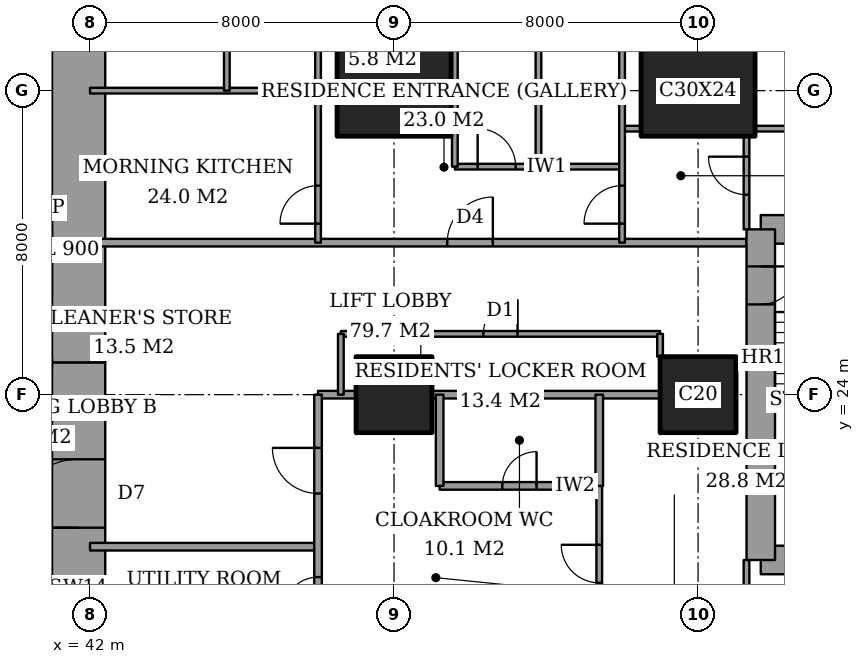
"""IFC4 building model, lengths in metres.
Left out: names, types, materials, properties, quantities, classifications, styles, units other than length and angle.
Written with IfcOpenShell. Run it as: python <this file> out.ifc"""

import sys

from ifc_helpers import new_model, si_unit, direction, frame, frame_2d, origin, origin_2d, place, context, subcontext, project, spatial, rectangle, extrude, element, fill, save


model = new_model("IFC4")
c1 = context("Model", 3, precision=1e-05, world=origin(), true_north=direction((0.0, 1.0)))
c2 = subcontext(c1, "Body", "Model", "MODEL_VIEW")
j1 = project(units=[si_unit("LENGTHUNIT", "METRE"), si_unit("PLANEANGLEUNIT", "RADIAN")], contexts=[c1])
p1 = place(None, origin())
s1 = spatial("IfcSite", under=j1, at=p1, CompositionType="ELEMENT")
p2 = place(p1, origin())
s2 = spatial("IfcBuilding", under=s1, at=p2, CompositionType="ELEMENT")
p3 = place(p2, frame((0.0, 0.0, 153.8)))
s3 = spatial("IfcBuildingStorey", under=s2, at=p3, CompositionType="ELEMENT", Elevation=153.8)
p4 = place(p3, frame((50.0, 24.0, 0.0), z_axis=(0.0, 0.0, 1.0), x_axis=(1.0, 0.0, 0.0)))
e1 = element("IfcColumn", 1, at=p4, inside=s3, PredefinedType="COLUMN", context=c2, shape_type="SweptSolid", body=[
    extrude(rectangle(XDim=2.0, YDim=2.0, at=origin_2d()), origin(), (0.0, 0.0, 1.0), 3.6),
])
p5 = place(p3, frame((50.0, 32.0, 0.0), z_axis=(0.0, 0.0, 1.0), x_axis=(1.0, 0.0, 0.0)))
e2 = element("IfcColumn", 2, at=p5, inside=s3, PredefinedType="COLUMN", context=c2, shape_type="SweptSolid", body=[
    extrude(rectangle(XDim=3.0, YDim=2.4, at=origin_2d()), origin(), (0.0, 0.0, 1.0), 3.6),
])
p6 = place(p3, frame((58.0, 24.0, 0.0), z_axis=(0.0, 0.0, 1.0), x_axis=(1.0, 0.0, 0.0)))
e3 = element("IfcColumn", 3, at=p6, inside=s3, PredefinedType="COLUMN", context=c2, shape_type="SweptSolid", body=[
    extrude(rectangle(XDim=2.0, YDim=2.0, at=origin_2d()), origin(), (0.0, 0.0, 1.0), 3.6),
])
p7 = place(p3, frame((58.0, 32.0, 0.0), z_axis=(0.0, 0.0, 1.0), x_axis=(1.0, 0.0, 0.0)))
e4 = element("IfcColumn", 4, at=p7, inside=s3, PredefinedType="COLUMN", context=c2, shape_type="SweptSolid", body=[
    extrude(rectangle(XDim=3.0, YDim=2.4, at=origin_2d()), origin(), (0.0, 0.0, 1.0), 3.6),
])
p8 = place(p3, frame((41.7, 13.0, 0.0), z_axis=(0.0, 0.0, 1.0), x_axis=(0.0, 1.0, 0.0)))
e5 = element("IfcWall", 5, at=p8, inside=s3, PredefinedType="SHEAR", context=c2, shape_type="SweptSolid", body=[
    extrude(rectangle(XDim=11.85, YDim=1.4, at=frame_2d((5.925, 0.0))), origin(), (0.0, 0.0, 1.0), 3.6),
])
p9 = place(p8, frame((7.5, 0.0, 0.0)))
e6 = element("IfcOpeningElement", 6, at=p9, cuts=e5, PredefinedType="OPENING", context=c2, shape_type="SweptSolid", body=[
    extrude(rectangle(XDim=1.8, YDim=2.4, at=frame_2d((0.9, 1.2))), frame((0.0, 0.71, 0.0), z_axis=(0.0, -1.0, 0.0), x_axis=(1.0, 0.0, 0.0)), (0.0, 0.0, 1.0), 1.42),
])
p10 = place(p3, frame((41.7, 24.85, 0.0), z_axis=(0.0, 0.0, 1.0), x_axis=(0.0, 1.0, 0.0)))
e7 = element("IfcWall", 7, at=p10, inside=s3, PredefinedType="SHEAR", context=c2, shape_type="SweptSolid", body=[
    extrude(rectangle(XDim=10.15, YDim=1.4, at=frame_2d((5.075, 0.0))), origin(), (0.0, 0.0, 1.0), 3.6),
])
for number, where, z_axis, x_axis in (
    (8, (59.65, 19.65, 0.0), (0.0, 0.0, 1.0), (1.0, 0.0, 0.0)),
    (9, (64.1, 28.35, 0.0), (0.0, 0.0, 1.0), (-1.0, 0.0, 0.0)),
):
    element("IfcWall", number, at=place(p3, frame(where, z_axis=z_axis, x_axis=x_axis)), inside=s3, PredefinedType="SHEAR", context=c2, shape_type="SweptSolid", body=[
        extrude(rectangle(XDim=4.45, YDim=0.75, at=frame_2d((2.225, 0.0))), origin(), (0.0, 0.0, 1.0), 3.6),
    ])
p11 = place(p3, frame((59.65, 28.35, 0.0), z_axis=(0.0, 0.0, 1.0), x_axis=(0.0, -1.0, 0.0)))
e10 = element("IfcWall", 10, at=p11, inside=s3, PredefinedType="SHEAR", context=c2, shape_type="SweptSolid", body=[
    extrude(rectangle(XDim=8.7, YDim=0.75, at=frame_2d((4.35, 0.0))), origin(), (0.0, 0.0, 1.0), 3.6),
])
p12 = place(p11, frame((0.975, 0.0, 0.0)))
e11 = element("IfcOpeningElement", 11, at=p12, cuts=e10, PredefinedType="OPENING", context=c2, shape_type="SweptSolid", body=[
    extrude(rectangle(XDim=1.0, YDim=2.1, at=frame_2d((0.5, 1.05))), frame((0.0, 0.385, 0.0), z_axis=(0.0, -1.0, 0.0), x_axis=(1.0, 0.0, 0.0)), (0.0, 0.0, 1.0), 0.77),
])
p13 = place(p3, frame((42.0, 20.0, 0.0), z_axis=(0.0, 0.0, 1.0), x_axis=(1.0, 0.0, 0.0)))
e12 = element("IfcWall", 12, at=p13, inside=s3, PredefinedType="PARTITIONING", context=c2, shape_type="SweptSolid", body=[
    extrude(rectangle(XDim=6.0, YDim=0.2, at=frame_2d((3.0, 0.0))), origin(), (0.0, 0.0, 1.0), 3.35),
])
p14 = place(p3, frame((51.2, 21.6, 0.0), z_axis=(0.0, 0.0, 1.0), x_axis=(1.0, 0.0, 0.0)))
e13 = element("IfcWall", 13, at=p14, inside=s3, PredefinedType="PARTITIONING", context=c2, shape_type="SweptSolid", body=[
    extrude(rectangle(XDim=4.2, YDim=0.2, at=frame_2d((2.1, 0.0))), origin(), (0.0, 0.0, 1.0), 3.35),
])
p15 = place(p14, frame((1.65, 0.0, 0.0)))
e14 = element("IfcOpeningElement", 14, at=p15, cuts=e13, PredefinedType="OPENING", context=c2, shape_type="SweptSolid", body=[
    extrude(rectangle(XDim=0.9, YDim=2.1, at=frame_2d((0.45, 1.05))), frame((0.0, 0.11, 0.0), z_axis=(0.0, -1.0, 0.0), x_axis=(1.0, 0.0, 0.0)), (0.0, 0.0, 1.0), 0.22),
])
p16 = place(p3, frame((48.0, 24.0, 0.0), z_axis=(0.0, 0.0, 1.0), x_axis=(1.0, 0.0, 0.0)))
e15 = element("IfcWall", 15, at=p16, inside=s3, PredefinedType="PARTITIONING", context=c2, shape_type="SweptSolid", body=[
    extrude(rectangle(XDim=1.0, YDim=0.2, at=frame_2d((0.5, 0.0))), origin(), (0.0, 0.0, 1.0), 3.35),
])
p17 = place(p3, frame((51.0, 24.0, 0.0), z_axis=(0.0, 0.0, 1.0), x_axis=(1.0, 0.0, 0.0)))
e16 = element("IfcWall", 16, at=p17, inside=s3, PredefinedType="PARTITIONING", context=c2, shape_type="SweptSolid", body=[
    extrude(rectangle(XDim=6.0, YDim=0.2, at=frame_2d((3.0, 0.0))), origin(), (0.0, 0.0, 1.0), 3.35),
])
p18 = place(p3, frame((48.6, 25.6, 0.0), z_axis=(0.0, 0.0, 1.0), x_axis=(1.0, 0.0, 0.0)))
e17 = element("IfcWall", 17, at=p18, inside=s3, PredefinedType="PARTITIONING", context=c2, shape_type="SweptSolid", body=[
    extrude(rectangle(XDim=8.4, YDim=0.15, at=frame_2d((4.2, 0.0))), origin(), (0.0, 0.0, 1.0), 3.35),
])
p19 = place(p18, frame((3.75, 0.0, 0.0)))
e18 = element("IfcOpeningElement", 18, at=p19, cuts=e17, PredefinedType="OPENING", context=c2, shape_type="SweptSolid", body=[
    extrude(rectangle(XDim=0.9, YDim=2.1, at=frame_2d((0.45, 1.05))), frame((0.0, 0.085, 0.0), z_axis=(0.0, -1.0, 0.0), x_axis=(1.0, 0.0, 0.0)), (0.0, 0.0, 1.0), 0.17),
])
p20 = place(p3, frame((42.0, 28.0, 0.0), z_axis=(0.0, 0.0, 1.0), x_axis=(1.0, 0.0, 0.0)))
e19 = element("IfcWall", 19, at=p20, inside=s3, PredefinedType="PARTITIONING", context=c2, shape_type="SweptSolid", body=[
    extrude(rectangle(XDim=17.275, YDim=0.2, at=frame_2d((8.637, 0.0))), origin(), (0.0, 0.0, 1.0), 3.35),
])
p21 = place(p20, frame((9.4, 0.0, 0.0)))
e20 = element("IfcOpeningElement", 20, at=p21, cuts=e19, PredefinedType="OPENING", context=c2, shape_type="SweptSolid", body=[
    extrude(rectangle(XDim=1.2, YDim=2.4, at=frame_2d((0.6, 1.2))), frame((0.0, 0.11, 0.0), z_axis=(0.0, -1.0, 0.0), x_axis=(1.0, 0.0, 0.0)), (0.0, 0.0, 1.0), 0.22),
])
p22 = place(p3, frame((51.6, 30.0, 0.0), z_axis=(0.0, 0.0, 1.0), x_axis=(1.0, 0.0, 0.0)))
e21 = element("IfcWall", 21, at=p22, inside=s3, PredefinedType="PARTITIONING", context=c2, shape_type="SweptSolid", body=[
    extrude(rectangle(XDim=4.4, YDim=0.15, at=frame_2d((2.2, 0.0))), origin(), (0.0, 0.0, 1.0), 3.35),
])
p23 = place(p22, frame((0.6, 0.0, 0.0)))
e22 = element("IfcOpeningElement", 22, at=p23, cuts=e21, PredefinedType="OPENING", context=c2, shape_type="SweptSolid", body=[
    extrude(rectangle(XDim=1.0, YDim=2.1, at=frame_2d((0.5, 1.05))), frame((0.0, 0.085, 0.0), z_axis=(0.0, -1.0, 0.0), x_axis=(1.0, 0.0, 0.0)), (0.0, 0.0, 1.0), 0.17),
])
p24 = place(p3, frame((56.0, 31.0, 0.0), z_axis=(0.0, 0.0, 1.0), x_axis=(1.0, 0.0, 0.0)))
e23 = element("IfcWall", 23, at=p24, inside=s3, PredefinedType="PARTITIONING", context=c2, shape_type="SweptSolid", body=[
    extrude(rectangle(XDim=0.5, YDim=0.15, at=frame_2d((0.25, 0.0))), origin(), (0.0, 0.0, 1.0), 3.35),
])
p25 = place(p3, frame((59.5, 31.0, 0.0), z_axis=(0.0, 0.0, 1.0), x_axis=(1.0, 0.0, 0.0)))
e24 = element("IfcWall", 24, at=p25, inside=s3, PredefinedType="PARTITIONING", context=c2, shape_type="SweptSolid", body=[
    extrude(rectangle(XDim=5.15, YDim=0.15, at=frame_2d((2.575, 0.0))), origin(), (0.0, 0.0, 1.0), 3.35),
])
p26 = place(p3, frame((48.0, 31.95, 0.0), z_axis=(0.0, 0.0, 1.0), x_axis=(1.0, 0.0, 0.0)))
e25 = element("IfcWall", 25, at=p26, inside=s3, PredefinedType="PARTITIONING", context=c2, shape_type="SweptSolid", body=[
    extrude(rectangle(XDim=0.5, YDim=0.15, at=frame_2d((0.25, 0.0))), origin(), (0.0, 0.0, 1.0), 2.634),
])
p27 = place(p3, frame((42.0, 32.0, 0.0), z_axis=(0.0, 0.0, 1.0), x_axis=(1.0, 0.0, 0.0)))
e26 = element("IfcWall", 26, at=p27, inside=s3, PredefinedType="PARTITIONING", context=c2, shape_type="SweptSolid", body=[
    extrude(rectangle(XDim=6.0, YDim=0.15, at=frame_2d((3.0, 0.0))), origin(), (0.0, 0.0, 1.0), 2.634),
])
p28 = place(p3, frame((45.6, 32.0, 0.0), z_axis=(0.0, 0.0, 1.0), x_axis=(0.0, 1.0, 0.0)))
e27 = element("IfcWall", 27, at=p28, inside=s3, PredefinedType="PARTITIONING", context=c2, shape_type="SweptSolid", body=[
    extrude(rectangle(XDim=2.4, YDim=0.15, at=frame_2d((1.2, 0.0))), origin(), (0.0, 0.0, 1.0), 3.35),
])
p29 = place(p3, frame((48.0, 17.5, 0.0), z_axis=(0.0, 0.0, 1.0), x_axis=(0.0, 1.0, 0.0)))
e28 = element("IfcWall", 28, at=p29, inside=s3, PredefinedType="PARTITIONING", context=c2, shape_type="SweptSolid", body=[
    extrude(rectangle(XDim=6.5, YDim=0.2, at=frame_2d((3.25, 0.0))), origin(), (0.0, 0.0, 1.0), 3.35),
])
p30 = place(p29, frame((3.9, 0.0, 0.0)))
e29 = element("IfcOpeningElement", 29, at=p30, cuts=e28, PredefinedType="OPENING", context=c2, shape_type="SweptSolid", body=[
    extrude(rectangle(XDim=1.2, YDim=2.4, at=frame_2d((0.6, 1.2))), frame((0.0, 0.11, 0.0), z_axis=(0.0, -1.0, 0.0), x_axis=(1.0, 0.0, 0.0)), (0.0, 0.0, 1.0), 0.22),
])
p31 = place(p29, frame((0.8, 0.0, 0.0)))
e30 = element("IfcOpeningElement", 30, at=p31, cuts=e28, PredefinedType="OPENING", context=c2, shape_type="SweptSolid", body=[
    extrude(rectangle(XDim=0.9, YDim=2.1, at=frame_2d((0.45, 1.05))), frame((0.0, 0.11, 0.0), z_axis=(0.0, -1.0, 0.0), x_axis=(1.0, 0.0, 0.0)), (0.0, 0.0, 1.0), 0.22),
])
p32 = place(p3, frame((48.0, 28.0, 0.0), z_axis=(0.0, 0.0, 1.0), x_axis=(0.0, 1.0, 0.0)))
e31 = element("IfcWall", 31, at=p32, inside=s3, PredefinedType="PARTITIONING", context=c2, shape_type="SweptSolid", body=[
    extrude(rectangle(XDim=9.4, YDim=0.15, at=frame_2d((4.7, 0.0))), origin(), (0.0, 0.0, 1.0), 3.35),
])
p33 = place(p32, frame((0.5, 0.0, 0.0)))
e32 = element("IfcOpeningElement", 32, at=p33, cuts=e31, PredefinedType="OPENING", context=c2, shape_type="SweptSolid", body=[
    extrude(rectangle(XDim=1.0, YDim=2.1, at=frame_2d((0.5, 1.05))), frame((0.0, 0.085, 0.0), z_axis=(0.0, -1.0, 0.0), x_axis=(1.0, 0.0, 0.0)), (0.0, 0.0, 1.0), 0.17),
])
p34 = place(p3, frame((48.6, 24.0, 0.0), z_axis=(0.0, 0.0, 1.0), x_axis=(0.0, 1.0, 0.0)))
e33 = element("IfcWall", 33, at=p34, inside=s3, PredefinedType="PARTITIONING", context=c2, shape_type="SweptSolid", body=[
    extrude(rectangle(XDim=1.6, YDim=0.15, at=frame_2d((0.8, 0.0))), origin(), (0.0, 0.0, 1.0), 3.35),
])
p35 = place(p3, frame((51.2, 21.6, 0.0), z_axis=(0.0, 0.0, 1.0), x_axis=(0.0, 1.0, 0.0)))
e34 = element("IfcWall", 34, at=p35, inside=s3, PredefinedType="PARTITIONING", context=c2, shape_type="SweptSolid", body=[
    extrude(rectangle(XDim=2.4, YDim=0.2, at=frame_2d((1.2, 0.0))), origin(), (0.0, 0.0, 1.0), 3.35),
])
for number, where, z_axis, x_axis in (
    (35, (51.6, 30.0, 0.0), (0.0, 0.0, 1.0), (0.0, 1.0, 0.0)),
    (36, (53.8, 30.0, 0.0), (0.0, 0.0, 1.0), (0.0, 1.0, 0.0)),
):
    element("IfcWall", number, at=place(p3, frame(where, z_axis=z_axis, x_axis=x_axis)), inside=s3, PredefinedType="PARTITIONING", context=c2, shape_type="SweptSolid", body=[
        extrude(rectangle(XDim=7.4, YDim=0.15, at=frame_2d((3.7, 0.0))), origin(), (0.0, 0.0, 1.0), 3.35),
    ])
p36 = place(p3, frame((55.4, 21.6, 0.0), z_axis=(0.0, 0.0, 1.0), x_axis=(0.0, 1.0, 0.0)))
e37 = element("IfcWall", 37, at=p36, inside=s3, PredefinedType="PARTITIONING", context=c2, shape_type="SweptSolid", body=[
    extrude(rectangle(XDim=2.4, YDim=0.2, at=frame_2d((1.2, 0.0))), origin(), (0.0, 0.0, 1.0), 3.35),
])
p37 = place(p3, frame((55.4, 11.0, 0.0), z_axis=(0.0, 0.0, 1.0), x_axis=(0.0, 1.0, 0.0)))
e38 = element("IfcWall", 38, at=p37, inside=s3, PredefinedType="PARTITIONING", context=c2, shape_type="SweptSolid", body=[
    extrude(rectangle(XDim=10.6, YDim=0.15, at=frame_2d((5.3, 0.0))), origin(), (0.0, 0.0, 1.0), 3.35),
])
p38 = place(p37, frame((8.05, 0.0, 0.0)))
e39 = element("IfcOpeningElement", 39, at=p38, cuts=e38, PredefinedType="OPENING", context=c2, shape_type="SweptSolid", body=[
    extrude(rectangle(XDim=1.0, YDim=2.1, at=frame_2d((0.5, 1.05))), frame((0.0, 0.085, 0.0), z_axis=(0.0, -1.0, 0.0), x_axis=(1.0, 0.0, 0.0)), (0.0, 0.0, 1.0), 0.17),
])
p39 = place(p3, frame((56.0, 28.0, 0.0), z_axis=(0.0, 0.0, 1.0), x_axis=(0.0, 1.0, 0.0)))
e40 = element("IfcWall", 40, at=p39, inside=s3, PredefinedType="PARTITIONING", context=c2, shape_type="SweptSolid", body=[
    extrude(rectangle(XDim=9.4, YDim=0.15, at=frame_2d((4.7, 0.0))), origin(), (0.0, 0.0, 1.0), 3.35),
])
p40 = place(p39, frame((0.5, 0.0, 0.0)))
e41 = element("IfcOpeningElement", 41, at=p40, cuts=e40, PredefinedType="OPENING", context=c2, shape_type="SweptSolid", body=[
    extrude(rectangle(XDim=1.0, YDim=2.1, at=frame_2d((0.5, 1.05))), frame((0.0, 0.085, 0.0), z_axis=(0.0, -1.0, 0.0), x_axis=(1.0, 0.0, 0.0)), (0.0, 0.0, 1.0), 0.17),
])
p41 = place(p3, frame((57.0, 25.0, 0.0), z_axis=(0.0, 0.0, 1.0), x_axis=(0.0, 1.0, 0.0)))
e42 = element("IfcWall", 42, at=p41, inside=s3, PredefinedType="PARTITIONING", context=c2, shape_type="SweptSolid", body=[
    extrude(rectangle(XDim=0.6, YDim=0.15, at=frame_2d((0.3, 0.0))), origin(), (0.0, 0.0, 1.0), 3.35),
])
p42 = place(p3, frame((59.275, 17.2, 0.0), z_axis=(0.0, 0.0, 1.0), x_axis=(0.0, 1.0, 0.0)))
e43 = element("IfcWall", 43, at=p42, inside=s3, PredefinedType="PARTITIONING", context=c2, shape_type="SweptSolid", body=[
    extrude(rectangle(XDim=2.45, YDim=0.15, at=frame_2d((1.225, 0.0))), origin(), (0.0, 0.0, 1.0), 3.35),
])
p43 = place(p42, frame((0.587, 0.0, 0.0)))
e44 = element("IfcOpeningElement", 44, at=p43, cuts=e43, PredefinedType="OPENING", context=c2, shape_type="SweptSolid", body=[
    extrude(rectangle(XDim=0.9, YDim=2.1, at=frame_2d((0.45, 1.05))), frame((0.0, 0.085, 0.0), z_axis=(0.0, -1.0, 0.0), x_axis=(1.0, 0.0, 0.0)), (0.0, 0.0, 1.0), 0.17),
])
p44 = place(p3, frame((59.275, 28.35, 0.0), z_axis=(0.0, 0.0, 1.0), x_axis=(0.0, 1.0, 0.0)))
e45 = element("IfcWall", 45, at=p44, inside=s3, PredefinedType="PARTITIONING", context=c2, shape_type="SweptSolid", body=[
    extrude(rectangle(XDim=2.45, YDim=0.15, at=frame_2d((1.225, 0.0))), origin(), (0.0, 0.0, 1.0), 3.35),
])
p45 = place(p44, frame((0.913, 0.0, 0.0)))
e46 = element("IfcOpeningElement", 46, at=p45, cuts=e45, PredefinedType="OPENING", context=c2, shape_type="SweptSolid", body=[
    extrude(rectangle(XDim=1.0, YDim=2.1, at=frame_2d((0.5, 1.05))), frame((0.0, 0.085, 0.0), z_axis=(0.0, -1.0, 0.0), x_axis=(1.0, 0.0, 0.0)), (0.0, 0.0, 1.0), 0.17),
])
p46 = place(p38, origin())
e47 = element("IfcDoor", 47, at=p46, inside=s3, OperationType="SINGLE_SWING_LEFT", PredefinedType="DOOR", context=c2, shape_type="SweptSolid", body=[
    extrude(rectangle(XDim=1.0, YDim=2.1, at=frame_2d((0.5, 1.05))), frame((0.0, 0.025, 0.0), z_axis=(0.0, -1.0, 0.0), x_axis=(1.0, 0.0, 0.0)), (0.0, 0.0, 1.0), 0.05),
])
fill(e39, e47)
p47 = place(p15, origin())
e48 = element("IfcDoor", 48, at=p47, inside=s3, OperationType="SINGLE_SWING_LEFT", PredefinedType="DOOR", context=c2, shape_type="SweptSolid", body=[
    extrude(rectangle(XDim=0.9, YDim=2.1, at=frame_2d((0.45, 1.05))), frame((0.0, 0.025, 0.0), z_axis=(0.0, -1.0, 0.0), x_axis=(1.0, 0.0, 0.0)), (0.0, 0.0, 1.0), 0.05),
])
fill(e14, e48)
p48 = place(p30, origin())
e49 = element("IfcDoor", 49, at=p48, inside=s3, OperationType="SINGLE_SWING_LEFT", PredefinedType="DOOR", context=c2, shape_type="SweptSolid", body=[
    extrude(rectangle(XDim=1.2, YDim=2.4, at=frame_2d((0.6, 1.2))), frame((0.0, 0.025, 0.0), z_axis=(0.0, -1.0, 0.0), x_axis=(1.0, 0.0, 0.0)), (0.0, 0.0, 1.0), 0.05),
])
fill(e29, e49)
p49 = place(p31, origin())
e50 = element("IfcDoor", 50, at=p49, inside=s3, OperationType="SINGLE_SWING_RIGHT", PredefinedType="DOOR", context=c2, shape_type="SweptSolid", body=[
    extrude(rectangle(XDim=0.9, YDim=2.1, at=frame_2d((0.45, 1.05))), frame((0.0, 0.025, 0.0), z_axis=(0.0, -1.0, 0.0), x_axis=(1.0, 0.0, 0.0)), (0.0, 0.0, 1.0), 0.05),
])
fill(e30, e50)
p50 = place(p45, origin())
e51 = element("IfcDoor", 51, at=p50, inside=s3, OperationType="SINGLE_SWING_LEFT", PredefinedType="DOOR", context=c2, shape_type="SweptSolid", body=[
    extrude(rectangle(XDim=1.0, YDim=2.1, at=frame_2d((0.5, 1.05))), frame((0.0, 0.025, 0.0), z_axis=(0.0, -1.0, 0.0), x_axis=(1.0, 0.0, 0.0)), (0.0, 0.0, 1.0), 0.05),
])
fill(e46, e51)
p51 = place(p40, origin())
e52 = element("IfcDoor", 52, at=p51, inside=s3, OperationType="SINGLE_SWING_RIGHT", PredefinedType="DOOR", context=c2, shape_type="SweptSolid", body=[
    extrude(rectangle(XDim=1.0, YDim=2.1, at=frame_2d((0.5, 1.05))), frame((0.0, 0.025, 0.0), z_axis=(0.0, -1.0, 0.0), x_axis=(1.0, 0.0, 0.0)), (0.0, 0.0, 1.0), 0.05),
])
fill(e41, e52)
p52 = place(p21, origin())
e53 = element("IfcDoor", 53, at=p52, inside=s3, OperationType="SINGLE_SWING_LEFT", PredefinedType="DOOR", context=c2, shape_type="SweptSolid", body=[
    extrude(rectangle(XDim=1.2, YDim=2.4, at=frame_2d((0.6, 1.2))), frame((0.0, 0.025, 0.0), z_axis=(0.0, -1.0, 0.0), x_axis=(1.0, 0.0, 0.0)), (0.0, 0.0, 1.0), 0.05),
])
fill(e20, e53)
p53 = place(p23, origin())
e54 = element("IfcDoor", 54, at=p53, inside=s3, OperationType="SINGLE_SWING_RIGHT", PredefinedType="DOOR", context=c2, shape_type="SweptSolid", body=[
    extrude(rectangle(XDim=1.0, YDim=2.1, at=frame_2d((0.5, 1.05))), frame((0.0, 0.025, 0.0), z_axis=(0.0, -1.0, 0.0), x_axis=(1.0, 0.0, 0.0)), (0.0, 0.0, 1.0), 0.05),
])
fill(e22, e54)
p54 = place(p33, origin())
e55 = element("IfcDoor", 55, at=p54, inside=s3, OperationType="SINGLE_SWING_RIGHT", PredefinedType="DOOR", context=c2, shape_type="SweptSolid", body=[
    extrude(rectangle(XDim=1.0, YDim=2.1, at=frame_2d((0.5, 1.05))), frame((0.0, 0.025, 0.0), z_axis=(0.0, -1.0, 0.0), x_axis=(1.0, 0.0, 0.0)), (0.0, 0.0, 1.0), 0.05),
])
fill(e32, e55)
p55 = place(p19, origin())
e56 = element("IfcDoor", 56, at=p55, inside=s3, OperationType="SINGLE_SWING_LEFT", PredefinedType="DOOR", context=c2, shape_type="SweptSolid", body=[
    extrude(rectangle(XDim=0.9, YDim=2.1, at=frame_2d((0.45, 1.05))), frame((0.0, 0.025, 0.0), z_axis=(0.0, -1.0, 0.0), x_axis=(1.0, 0.0, 0.0)), (0.0, 0.0, 1.0), 0.05),
])
fill(e18, e56)
p56 = place(p9, origin())
e57 = element("IfcDoor", 57, at=p56, inside=s3, OperationType="DOUBLE_DOOR_DOUBLE_SWING", PredefinedType="DOOR", context=c2, shape_type="SweptSolid", body=[
    extrude(rectangle(XDim=1.8, YDim=2.4, at=frame_2d((0.9, 1.2))), frame((0.0, 0.025, 0.0), z_axis=(0.0, -1.0, 0.0), x_axis=(1.0, 0.0, 0.0)), (0.0, 0.0, 1.0), 0.05),
])
fill(e6, e57)
p57 = place(p12, origin())
e58 = element("IfcDoor", 58, at=p57, inside=s3, OperationType="SINGLE_SWING_RIGHT", PredefinedType="DOOR", context=c2, shape_type="SweptSolid", body=[
    extrude(rectangle(XDim=1.0, YDim=2.1, at=frame_2d((0.5, 1.05))), frame((0.0, 0.025, 0.0), z_axis=(0.0, -1.0, 0.0), x_axis=(1.0, 0.0, 0.0)), (0.0, 0.0, 1.0), 0.05),
])
fill(e11, e58)
save(model, sys.argv[1])
